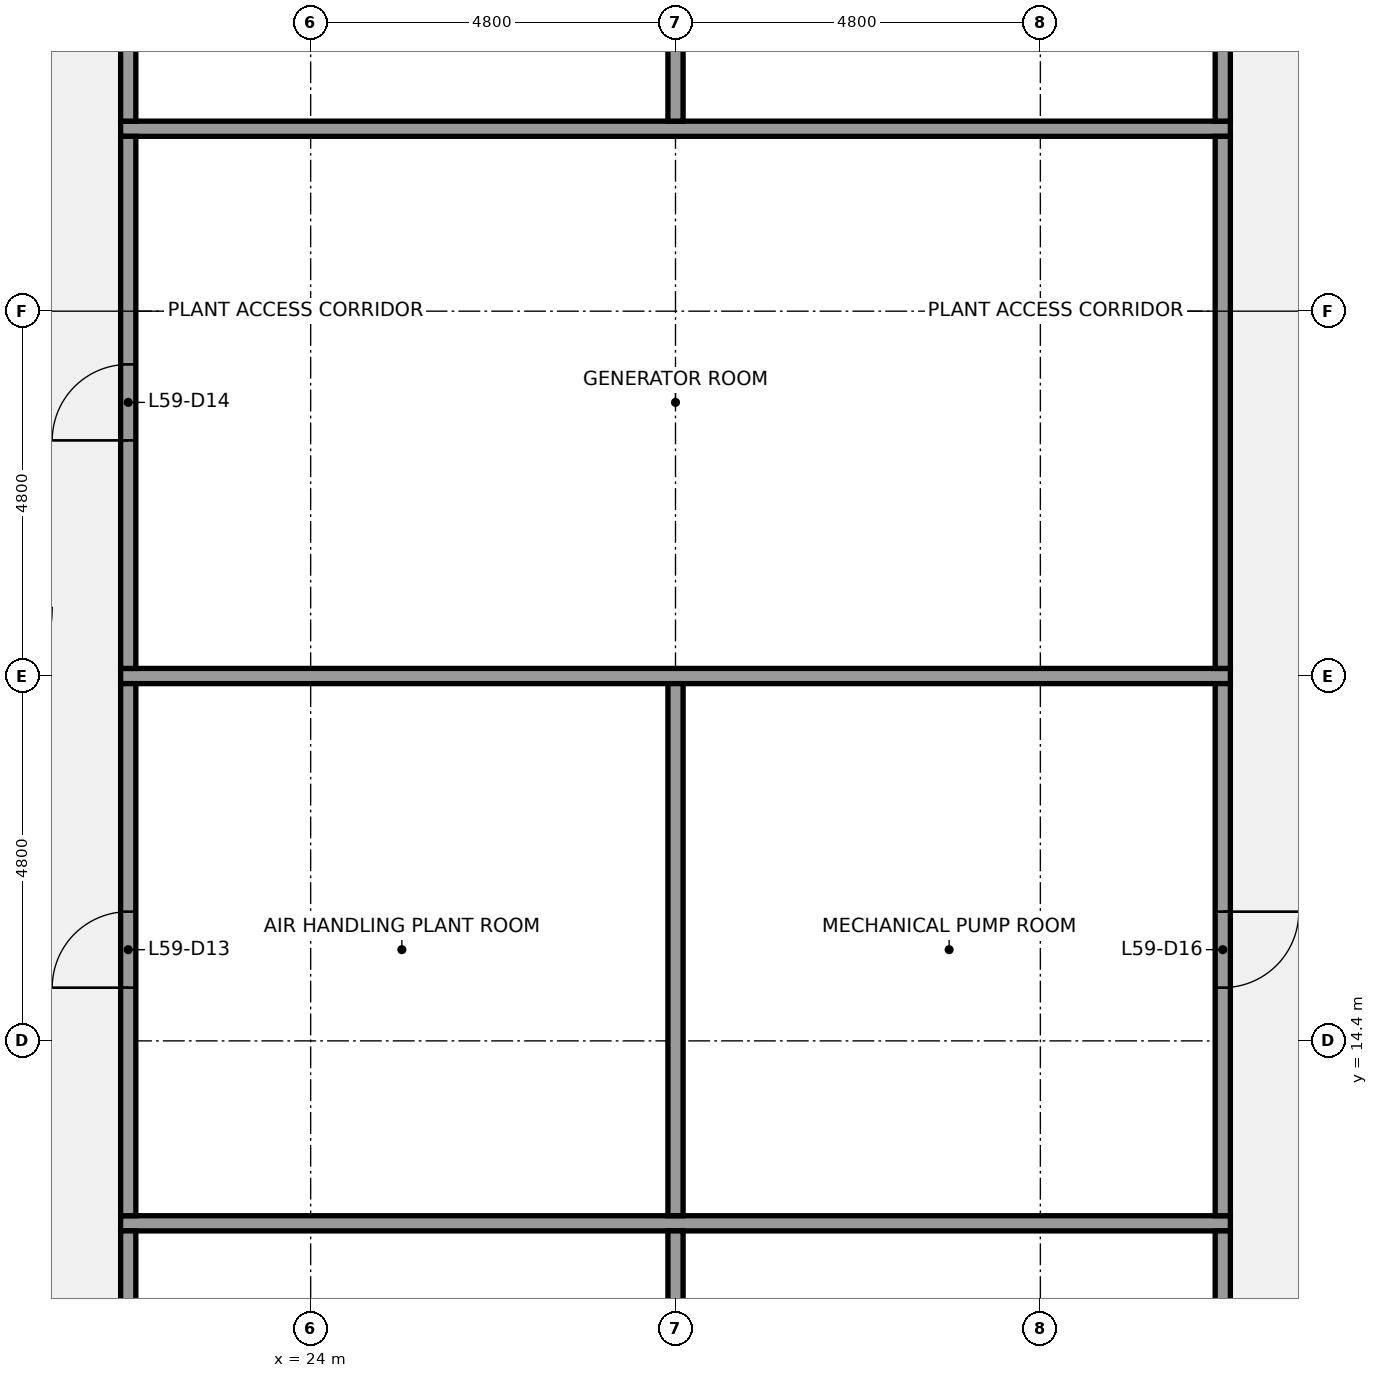
"""IFC4 building model, lengths in metres.
Left out: names, types, materials, properties, quantities, classifications, styles, units other than length and angle.
Written with IfcOpenShell. Run it as: python <this file> out.ifc"""

import sys

from ifc_helpers import new_model, si_unit, direction, frame, frame_2d, origin, place, context, subcontext, project, spatial, rectangle, extrude, element, fill, save


model = new_model("IFC4")
c1 = context("Model", 3, precision=1e-05, world=origin(), true_north=direction((0.0, 1.0)))
c2 = subcontext(c1, "Body", "Model", "MODEL_VIEW")
j1 = project(units=[si_unit("LENGTHUNIT", "METRE"), si_unit("PLANEANGLEUNIT", "RADIAN")], contexts=[c1])
p1 = place(None, origin())
s1 = spatial("IfcSite", under=j1, at=p1, CompositionType="ELEMENT")
p2 = place(p1, origin())
s2 = spatial("IfcBuilding", under=s1, at=p2, CompositionType="ELEMENT")
p3 = place(p2, frame((0.0, 0.0, 265.2)))
s3 = spatial("IfcBuildingStorey", under=s2, at=p3, CompositionType="ELEMENT", Elevation=265.2)
for number, where, z_axis, x_axis in (
    (1, (21.5, 12.0, 0.0), (0.0, 0.0, 1.0), (1.0, 0.0, 0.0)),
    (2, (21.5, 19.2, 0.0), (0.0, 0.0, 1.0), (1.0, 0.0, 0.0)),
    (3, (21.5, 26.4, 0.0), (0.0, 0.0, 1.0), (1.0, 0.0, 0.0)),
):
    element("IfcWall", number, at=place(p3, frame(where, z_axis=z_axis, x_axis=x_axis)), inside=s3, PredefinedType="PARTITIONING", context=c2, shape_type="SweptSolid", body=[
        extrude(rectangle(XDim=14.6, YDim=0.2, at=frame_2d((7.3, 0.0))), origin(), (0.0, 0.0, 1.0), 2.993),
    ])
p4 = place(p3, frame((21.6, 7.3, 0.0), z_axis=(0.0, 0.0, 1.0), x_axis=(0.0, 1.0, 0.0)))
e4 = element("IfcWall", 4, at=p4, inside=s3, PredefinedType="PARTITIONING", context=c2, shape_type="SweptSolid", body=[
    extrude(rectangle(XDim=4.6, YDim=0.2, at=frame_2d((2.3, 0.0))), origin(), (0.0, 0.0, 1.0), 2.993),
])
p5 = place(p3, frame((21.6, 12.1, 0.0), z_axis=(0.0, 0.0, 1.0), x_axis=(0.0, 1.0, 0.0)))
e5 = element("IfcWall", 5, at=p5, inside=s3, PredefinedType="PARTITIONING", context=c2, shape_type="SweptSolid", body=[
    extrude(rectangle(XDim=7.0, YDim=0.2, at=frame_2d((3.5, 0.0))), origin(), (0.0, 0.0, 1.0), 2.993),
])
p6 = place(p5, frame((3.0, 0.0, 0.0)))
e6 = element("IfcOpeningElement", 6, at=p6, cuts=e5, PredefinedType="OPENING", context=c2, shape_type="SweptSolid", body=[
    extrude(rectangle(XDim=1.0, YDim=2.1, at=frame_2d((0.5, 1.05))), frame((0.0, 0.11, 0.0), z_axis=(0.0, -1.0, 0.0), x_axis=(1.0, 0.0, 0.0)), (0.0, 0.0, 1.0), 0.22),
])
p7 = place(p3, frame((21.6, 19.3, 0.0), z_axis=(0.0, 0.0, 1.0), x_axis=(0.0, 1.0, 0.0)))
e7 = element("IfcWall", 7, at=p7, inside=s3, PredefinedType="PARTITIONING", context=c2, shape_type="SweptSolid", body=[
    extrude(rectangle(XDim=7.0, YDim=0.2, at=frame_2d((3.5, 0.0))), origin(), (0.0, 0.0, 1.0), 2.993),
])
p8 = place(p7, frame((3.0, 0.0, 0.0)))
e8 = element("IfcOpeningElement", 8, at=p8, cuts=e7, PredefinedType="OPENING", context=c2, shape_type="SweptSolid", body=[
    extrude(rectangle(XDim=1.0, YDim=2.1, at=frame_2d((0.5, 1.05))), frame((0.0, 0.11, 0.0), z_axis=(0.0, -1.0, 0.0), x_axis=(1.0, 0.0, 0.0)), (0.0, 0.0, 1.0), 0.22),
])
p9 = place(p3, frame((21.6, 26.5, 0.0), z_axis=(0.0, 0.0, 1.0), x_axis=(0.0, 1.0, 0.0)))
e9 = element("IfcWall", 9, at=p9, inside=s3, PredefinedType="PARTITIONING", context=c2, shape_type="SweptSolid", body=[
    extrude(rectangle(XDim=14.2, YDim=0.2, at=frame_2d((7.1, 0.0))), origin(), (0.0, 0.0, 1.0), 2.993),
])
p10 = place(p9, frame((6.6, 0.0, 0.0)))
e10 = element("IfcOpeningElement", 10, at=p10, cuts=e9, PredefinedType="OPENING", context=c2, shape_type="SweptSolid", body=[
    extrude(rectangle(XDim=1.0, YDim=2.1, at=frame_2d((0.5, 1.05))), frame((0.0, 0.11, 0.0), z_axis=(0.0, -1.0, 0.0), x_axis=(1.0, 0.0, 0.0)), (0.0, 0.0, 1.0), 0.22),
])
p11 = place(p3, frame((28.8, 7.3, 0.0), z_axis=(0.0, 0.0, 1.0), x_axis=(0.0, 1.0, 0.0)))
e11 = element("IfcWall", 11, at=p11, inside=s3, PredefinedType="PARTITIONING", context=c2, shape_type="SweptSolid", body=[
    extrude(rectangle(XDim=4.6, YDim=0.2, at=frame_2d((2.3, 0.0))), origin(), (0.0, 0.0, 1.0), 2.993),
])
p12 = place(p3, frame((28.8, 12.1, 0.0), z_axis=(0.0, 0.0, 1.0), x_axis=(0.0, 1.0, 0.0)))
e12 = element("IfcWall", 12, at=p12, inside=s3, PredefinedType="PARTITIONING", context=c2, shape_type="SweptSolid", body=[
    extrude(rectangle(XDim=7.0, YDim=0.2, at=frame_2d((3.5, 0.0))), origin(), (0.0, 0.0, 1.0), 2.993),
])
p13 = place(p3, frame((28.8, 26.5, 0.0), z_axis=(0.0, 0.0, 1.0), x_axis=(0.0, 1.0, 0.0)))
e13 = element("IfcWall", 13, at=p13, inside=s3, PredefinedType="PARTITIONING", context=c2, shape_type="SweptSolid", body=[
    extrude(rectangle(XDim=14.2, YDim=0.2, at=frame_2d((7.1, 0.0))), origin(), (0.0, 0.0, 1.0), 2.993),
])
p14 = place(p3, frame((36.0, 7.3, 0.0), z_axis=(0.0, 0.0, 1.0), x_axis=(0.0, 1.0, 0.0)))
e14 = element("IfcWall", 14, at=p14, inside=s3, PredefinedType="PARTITIONING", context=c2, shape_type="SweptSolid", body=[
    extrude(rectangle(XDim=4.6, YDim=0.2, at=frame_2d((2.3, 0.0))), origin(), (0.0, 0.0, 1.0), 2.993),
])
p15 = place(p3, frame((36.0, 12.1, 0.0), z_axis=(0.0, 0.0, 1.0), x_axis=(0.0, 1.0, 0.0)))
e15 = element("IfcWall", 15, at=p15, inside=s3, PredefinedType="PARTITIONING", context=c2, shape_type="SweptSolid", body=[
    extrude(rectangle(XDim=7.0, YDim=0.2, at=frame_2d((3.5, 0.0))), origin(), (0.0, 0.0, 1.0), 2.993),
])
p16 = place(p15, frame((3.0, 0.0, 0.0)))
e16 = element("IfcOpeningElement", 16, at=p16, cuts=e15, PredefinedType="OPENING", context=c2, shape_type="SweptSolid", body=[
    extrude(rectangle(XDim=1.0, YDim=2.1, at=frame_2d((0.5, 1.05))), frame((0.0, 0.11, 0.0), z_axis=(0.0, -1.0, 0.0), x_axis=(1.0, 0.0, 0.0)), (0.0, 0.0, 1.0), 0.22),
])
p17 = place(p3, frame((36.0, 19.3, 0.0), z_axis=(0.0, 0.0, 1.0), x_axis=(0.0, 1.0, 0.0)))
e17 = element("IfcWall", 17, at=p17, inside=s3, PredefinedType="PARTITIONING", context=c2, shape_type="SweptSolid", body=[
    extrude(rectangle(XDim=7.0, YDim=0.2, at=frame_2d((3.5, 0.0))), origin(), (0.0, 0.0, 1.0), 2.993),
])
p18 = place(p3, frame((36.0, 26.5, 0.0), z_axis=(0.0, 0.0, 1.0), x_axis=(0.0, 1.0, 0.0)))
e18 = element("IfcWall", 18, at=p18, inside=s3, PredefinedType="PARTITIONING", context=c2, shape_type="SweptSolid", body=[
    extrude(rectangle(XDim=14.2, YDim=0.2, at=frame_2d((7.1, 0.0))), origin(), (0.0, 0.0, 1.0), 2.993),
])
p19 = place(p18, frame((6.6, 0.0, 0.0)))
e19 = element("IfcOpeningElement", 19, at=p19, cuts=e18, PredefinedType="OPENING", context=c2, shape_type="SweptSolid", body=[
    extrude(rectangle(XDim=1.0, YDim=2.1, at=frame_2d((0.5, 1.05))), frame((0.0, 0.11, 0.0), z_axis=(0.0, -1.0, 0.0), x_axis=(1.0, 0.0, 0.0)), (0.0, 0.0, 1.0), 0.22),
])
p20 = place(p6, origin())
e20 = element("IfcDoor", 20, at=p20, inside=s3, OperationType="SINGLE_SWING_LEFT", PredefinedType="DOOR", context=c2, shape_type="SweptSolid", body=[
    extrude(rectangle(XDim=1.0, YDim=2.1, at=frame_2d((0.5, 1.05))), frame((0.0, 0.025, 0.0), z_axis=(0.0, -1.0, 0.0), x_axis=(1.0, 0.0, 0.0)), (0.0, 0.0, 1.0), 0.05),
])
fill(e6, e20)
p21 = place(p8, origin())
e21 = element("IfcDoor", 21, at=p21, inside=s3, OperationType="SINGLE_SWING_LEFT", PredefinedType="DOOR", context=c2, shape_type="SweptSolid", body=[
    extrude(rectangle(XDim=1.0, YDim=2.1, at=frame_2d((0.5, 1.05))), frame((0.0, 0.025, 0.0), z_axis=(0.0, -1.0, 0.0), x_axis=(1.0, 0.0, 0.0)), (0.0, 0.0, 1.0), 0.05),
])
fill(e8, e21)
p22 = place(p16, origin())
e22 = element("IfcDoor", 22, at=p22, inside=s3, OperationType="SINGLE_SWING_RIGHT", PredefinedType="DOOR", context=c2, shape_type="SweptSolid", body=[
    extrude(rectangle(XDim=1.0, YDim=2.1, at=frame_2d((0.5, 1.05))), frame((0.0, 0.025, 0.0), z_axis=(0.0, -1.0, 0.0), x_axis=(1.0, 0.0, 0.0)), (0.0, 0.0, 1.0), 0.05),
])
fill(e16, e22)
save(model, sys.argv[1])
